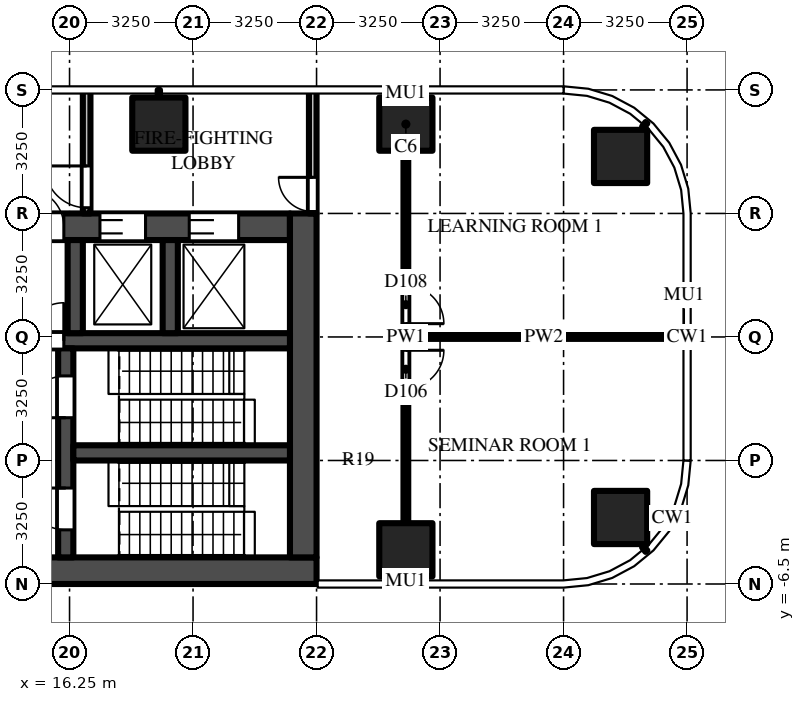
"""IFC4 building model, lengths in metres.
Left out: names, types, materials, properties, quantities, classifications, styles, units other than length and angle.
Written with IfcOpenShell. Run it as: python <this file> out.ifc"""

import sys

from ifc_helpers import new_model, si_unit, direction, frame, frame_2d, origin, origin_2d, place, context, subcontext, project, spatial, rectangle, extrude, source, transform, mapped, element, fill, save


model = new_model("IFC4")
c1 = context("Model", 3, precision=1e-05, world=origin(), true_north=direction((0.0, 1.0)))
c2 = subcontext(c1, "Body", "Model", "MODEL_VIEW")
j1 = project(units=[si_unit("LENGTHUNIT", "METRE"), si_unit("PLANEANGLEUNIT", "RADIAN")], contexts=[c1])
p1 = place(None, origin())
s1 = spatial("IfcSite", under=j1, at=p1, CompositionType="ELEMENT")
p2 = place(p1, origin())
s2 = spatial("IfcBuilding", under=s1, at=p2, CompositionType="ELEMENT")
p3 = place(p2, frame((0.0, 0.0, 61.0)))
s3 = spatial("IfcBuildingStorey", under=s2, at=p3, CompositionType="ELEMENT", Elevation=61.0)
m1 = source(origin(), c2, "Body", "SweptSolid", [
    extrude(rectangle(XDim=1.4, YDim=1.4, at=origin_2d()), origin(), (0.0, 0.0, 1.0), 4.5),
])
for number, where, z_axis, x_axis in (
    (1, (18.6, 5.6, 0.0), (0.0, 0.0, 1.0), (1.0, 0.0, 0.0)),
    (2, (25.1, 5.6, 0.0), (0.0, 0.0, 1.0), (1.0, 0.0, 0.0)),
    (3, (30.75, 4.75, 0.0), (0.0, 0.0, 1.0), (1.0, 0.0, 0.0)),
    (4, (25.1, -5.6, 0.0), (0.0, 0.0, 1.0), (1.0, 0.0, 0.0)),
    (5, (30.75, -4.75, 0.0), (0.0, 0.0, 1.0), (1.0, 0.0, 0.0)),
):
    element("IfcColumn", number, at=place(p3, frame(where, z_axis=z_axis, x_axis=x_axis)), inside=s3, PredefinedType="COLUMN", context=c2, shape_type="MappedRepresentation", body=[
        mapped(m1, transform((0.0, 0.0, 0.0))),
    ])
m2 = source(origin(), c2, "Body", "SweptSolid", [
    extrude(rectangle(XDim=16.45, YDim=0.7, at=frame_2d((8.225, 0.0))), origin(), (0.0, 0.0, 1.0), 4.25),
])
p4 = place(p3, frame((6.3, -6.15, 0.0), z_axis=(0.0, 0.0, 1.0), x_axis=(1.0, 0.0, 0.0)))
e6 = element("IfcWall", 6, at=p4, inside=s3, PredefinedType="SHEAR", context=c2, shape_type="MappedRepresentation", body=[
    mapped(m2, transform((0.0, 0.0, 0.0))),
])
m3 = source(origin(), c2, "Body", "SweptSolid", [
    extrude(rectangle(XDim=14.85, YDim=0.7, at=frame_2d((7.425, 0.0))), origin(), (0.0, 0.0, 1.0), 4.25),
])
p5 = place(p3, frame((7.2, 2.9, 0.0), z_axis=(0.0, 0.0, 1.0), x_axis=(1.0, 0.0, 0.0)))
e7 = element("IfcWall", 7, at=p5, inside=s3, PredefinedType="SHEAR", context=c2, shape_type="MappedRepresentation", body=[
    mapped(m3, transform((0.0, 0.0, 0.0))),
])
m4 = source(origin(), c2, "Body", "SweptSolid", [
    extrude(rectangle(XDim=1.3, YDim=2.1, at=frame_2d((0.65, 1.05))), frame((0.0, 0.36, 0.0), z_axis=(0.0, -1.0, 0.0), x_axis=(1.0, 0.0, 0.0)), (0.0, 0.0, 1.0), 0.72),
])
p6 = place(p5, frame((12.2, 0.0, 0.0)))
e8 = element("IfcOpeningElement", 8, at=p6, cuts=e7, PredefinedType="OPENING", context=c2, shape_type="MappedRepresentation", body=[
    mapped(m4, transform((0.0, 0.0, 0.0))),
])
m5 = source(origin(), c2, "Body", "SweptSolid", [
    extrude(rectangle(XDim=1.2, YDim=2.1, at=frame_2d((0.6, 1.05))), frame((0.0, 0.36, 0.0), z_axis=(0.0, -1.0, 0.0), x_axis=(1.0, 0.0, 0.0)), (0.0, 0.0, 1.0), 0.72),
])
p7 = place(p5, frame((9.85, 0.0, 0.0)))
e9 = element("IfcOpeningElement", 9, at=p7, cuts=e7, PredefinedType="OPENING", context=c2, shape_type="MappedRepresentation", body=[
    mapped(m5, transform((0.0, 0.0, 0.0))),
])
m6 = source(origin(), c2, "Body", "SweptSolid", [
    extrude(rectangle(XDim=1.0, YDim=2.1, at=frame_2d((0.5, 1.05))), frame((0.0, 0.36, 0.0), z_axis=(0.0, -1.0, 0.0), x_axis=(1.0, 0.0, 0.0)), (0.0, 0.0, 1.0), 0.72),
])
p8 = place(p5, frame((7.9, 0.0, 0.0)))
e10 = element("IfcOpeningElement", 10, at=p8, cuts=e7, PredefinedType="OPENING", context=c2, shape_type="MappedRepresentation", body=[
    mapped(m6, transform((0.0, 0.0, 0.0))),
])
m7 = source(origin(), c2, "Body", "SweptSolid", [
    extrude(rectangle(XDim=0.9, YDim=2.1, at=frame_2d((0.45, 1.05))), frame((0.0, 0.36, 0.0), z_axis=(0.0, -1.0, 0.0), x_axis=(1.0, 0.0, 0.0)), (0.0, 0.0, 1.0), 0.72),
])
p9 = place(p5, frame((0.65, 0.0, 0.0)))
e11 = element("IfcOpeningElement", 11, at=p9, cuts=e7, PredefinedType="OPENING", context=c2, shape_type="MappedRepresentation", body=[
    mapped(m7, transform((0.0, 0.0, 0.0))),
])
p10 = place(p5, frame((3.2, 0.0, 0.0)))
e12 = element("IfcOpeningElement", 12, at=p10, cuts=e7, PredefinedType="OPENING", context=c2, shape_type="MappedRepresentation", body=[
    mapped(m6, transform((0.0, 0.0, 0.0))),
])
p11 = place(p5, frame((5.85, 0.0, 0.0)))
e13 = element("IfcOpeningElement", 13, at=p11, cuts=e7, PredefinedType="OPENING", context=c2, shape_type="MappedRepresentation", body=[
    mapped(m7, transform((0.0, 0.0, 0.0))),
])
m8 = source(origin(), c2, "Body", "SweptSolid", [
    extrude(rectangle(XDim=9.05, YDim=0.7, at=frame_2d((4.525, 0.0))), origin(), (0.0, 0.0, 1.0), 4.25),
])
p12 = place(p3, frame((22.4, -5.8, 0.0), z_axis=(0.0, 0.0, 1.0), x_axis=(0.0, 1.0, 0.0)))
e14 = element("IfcWall", 14, at=p12, inside=s3, PredefinedType="SHEAR", context=c2, shape_type="MappedRepresentation", body=[
    mapped(m8, transform((0.0, 0.0, 0.0))),
])
m9 = source(origin(), c2, "Body", "SweptSolid", [
    extrude(rectangle(XDim=14.85, YDim=0.4, at=frame_2d((7.425, 0.0))), origin(), (0.0, 0.0, 1.0), 4.25),
])
p13 = place(p3, frame((7.2, -0.1, 0.0), z_axis=(0.0, 0.0, 1.0), x_axis=(1.0, 0.0, 0.0)))
e15 = element("IfcWall", 15, at=p13, inside=s3, PredefinedType="SHEAR", context=c2, shape_type="MappedRepresentation", body=[
    mapped(m9, transform((0.0, 0.0, 0.0))),
])
m10 = source(origin(), c2, "Body", "SweptSolid", [
    extrude(rectangle(XDim=1.0, YDim=2.1, at=frame_2d((0.5, 1.05))), frame((0.0, 0.21, 0.0), z_axis=(0.0, -1.0, 0.0), x_axis=(1.0, 0.0, 0.0)), (0.0, 0.0, 1.0), 0.42),
])
p14 = place(p13, frame((7.9, 0.0, 0.0)))
e16 = element("IfcOpeningElement", 16, at=p14, cuts=e15, PredefinedType="OPENING", context=c2, shape_type="MappedRepresentation", body=[
    mapped(m10, transform((0.0, 0.0, 0.0))),
])
m11 = source(origin(), c2, "Body", "SweptSolid", [
    extrude(rectangle(XDim=5.5, YDim=0.4, at=frame_2d((2.75, 0.0))), origin(), (0.0, 0.0, 1.0), 4.25),
])
p15 = place(p3, frame((16.15, -5.8, 0.0), z_axis=(0.0, 0.0, 1.0), x_axis=(0.0, 1.0, 0.0)))
e17 = element("IfcWall", 17, at=p15, inside=s3, PredefinedType="SHEAR", context=c2, shape_type="MappedRepresentation", body=[
    mapped(m11, transform((0.0, 0.0, 0.0))),
])
m12 = source(origin(), c2, "Body", "SweptSolid", [
    extrude(rectangle(XDim=1.1, YDim=2.1, at=frame_2d((0.55, 1.05))), frame((0.0, 0.21, 0.0), z_axis=(0.0, -1.0, 0.0), x_axis=(1.0, 0.0, 0.0)), (0.0, 0.0, 1.0), 0.42),
])
p16 = place(p15, frame((0.725, 0.0, 0.0)))
e18 = element("IfcOpeningElement", 18, at=p16, cuts=e17, PredefinedType="OPENING", context=c2, shape_type="MappedRepresentation", body=[
    mapped(m12, transform((0.0, 0.0, 0.0))),
])
p17 = place(p15, frame((3.675, 0.0, 0.0)))
e19 = element("IfcOpeningElement", 19, at=p17, cuts=e17, PredefinedType="OPENING", context=c2, shape_type="MappedRepresentation", body=[
    mapped(m12, transform((0.0, 0.0, 0.0))),
])
m13 = source(origin(), c2, "Body", "SweptSolid", [
    extrude(rectangle(XDim=5.7, YDim=0.4, at=frame_2d((2.85, 0.0))), origin(), (0.0, 0.0, 1.0), 4.25),
])
p18 = place(p3, frame((16.35, -3.05, 0.0), z_axis=(0.0, 0.0, 1.0), x_axis=(1.0, 0.0, 0.0)))
e20 = element("IfcWall", 20, at=p18, inside=s3, PredefinedType="SHEAR", context=c2, shape_type="MappedRepresentation", body=[
    mapped(m13, transform((0.0, 0.0, 0.0))),
])
m14 = source(origin(), c2, "Body", "SweptSolid", [
    extrude(rectangle(XDim=2.45, YDim=0.4, at=frame_2d((1.225, 0.0))), origin(), (0.0, 0.0, 1.0), 4.25),
])
for number, where, z_axis, x_axis in (
    (21, (16.4, 0.1, 0.0), (0.0, 0.0, 1.0), (0.0, 1.0, 0.0)),
    (22, (18.9, 0.1, 0.0), (0.0, 0.0, 1.0), (0.0, 1.0, 0.0)),
):
    element("IfcWall", number, at=place(p3, frame(where, z_axis=z_axis, x_axis=x_axis)), inside=s3, PredefinedType="SHEAR", context=c2, shape_type="MappedRepresentation", body=[
        mapped(m14, transform((0.0, 0.0, 0.0))),
    ])
m15 = source(origin(), c2, "Body", "SweptSolid", [
    extrude(rectangle(XDim=3.25, YDim=0.2, at=frame_2d((1.625, 0.0))), origin(), (0.0, 0.0, 1.0), 4.25),
])
p19 = place(p3, frame((16.7, 3.25, 0.0), z_axis=(0.0, 0.0, 1.0), x_axis=(0.0, 1.0, 0.0)))
e23 = element("IfcWall", 23, at=p19, inside=s3, PredefinedType="PARTITIONING", context=c2, shape_type="MappedRepresentation", body=[
    mapped(m15, transform((0.0, 0.0, 0.0))),
])
m16 = source(origin(), c2, "Body", "SweptSolid", [
    extrude(rectangle(XDim=1.1, YDim=2.1, at=frame_2d((0.55, 1.05))), frame((0.0, 0.11, 0.0), z_axis=(0.0, -1.0, 0.0), x_axis=(1.0, 0.0, 0.0)), (0.0, 0.0, 1.0), 0.22),
])
p20 = place(p19, frame((0.15, 0.0, 0.0)))
e24 = element("IfcOpeningElement", 24, at=p20, cuts=e23, PredefinedType="OPENING", context=c2, shape_type="MappedRepresentation", body=[
    mapped(m16, transform((0.0, 0.0, 0.0))),
])
p21 = place(p3, frame((22.65, 3.25, 0.0), z_axis=(0.0, 0.0, 1.0), x_axis=(0.0, 1.0, 0.0)))
e25 = element("IfcWall", 25, at=p21, inside=s3, PredefinedType="PARTITIONING", context=c2, shape_type="MappedRepresentation", body=[
    mapped(m15, transform((0.0, 0.0, 0.0))),
])
m17 = source(origin(), c2, "Body", "SweptSolid", [
    extrude(rectangle(XDim=0.9, YDim=2.1, at=frame_2d((0.45, 1.05))), frame((0.0, 0.11, 0.0), z_axis=(0.0, -1.0, 0.0), x_axis=(1.0, 0.0, 0.0)), (0.0, 0.0, 1.0), 0.22),
])
p22 = place(p21, frame((0.05, 0.0, 0.0)))
e26 = element("IfcOpeningElement", 26, at=p22, cuts=e25, PredefinedType="OPENING", context=c2, shape_type="MappedRepresentation", body=[
    mapped(m17, transform((0.0, 0.0, 0.0))),
])
m18 = source(origin(), c2, "Body", "SweptSolid", [
    extrude(rectangle(XDim=9.8, YDim=0.125, at=frame_2d((4.9, 0.0))), origin(), (0.0, 0.0, 1.0), 3.468),
])
p23 = place(p3, frame((25.1, 4.9, 0.0), z_axis=(0.0, 0.0, 1.0), x_axis=(0.0, -1.0, 0.0)))
e27 = element("IfcWall", 27, at=p23, inside=s3, PredefinedType="PARTITIONING", context=c2, shape_type="MappedRepresentation", body=[
    mapped(m18, transform((0.0, 0.0, 0.0))),
])
m19 = source(origin(), c2, "Body", "SweptSolid", [
    extrude(rectangle(XDim=1.0, YDim=2.1, at=frame_2d((0.5, 1.05))), frame((0.0, 0.073, 0.0), z_axis=(0.0, -1.0, 0.0), x_axis=(1.0, 0.0, 0.0)), (0.0, 0.0, 1.0), 0.145),
])
p24 = place(p23, frame((5.25, 0.0, 0.0)))
e28 = element("IfcOpeningElement", 28, at=p24, cuts=e27, PredefinedType="OPENING", context=c2, shape_type="MappedRepresentation", body=[
    mapped(m19, transform((0.0, 0.0, 0.0))),
])
p25 = place(p23, frame((3.55, 0.0, 0.0)))
e29 = element("IfcOpeningElement", 29, at=p25, cuts=e27, PredefinedType="OPENING", context=c2, shape_type="MappedRepresentation", body=[
    mapped(m19, transform((0.0, 0.0, 0.0))),
])
m20 = source(origin(), c2, "Body", "SweptSolid", [
    extrude(rectangle(XDim=7.137, YDim=0.1, at=frame_2d((3.569, 0.0))), origin(), (0.0, 0.0, 1.0), 3.33),
])
p26 = place(p3, frame((25.163, 0.0, 0.0), z_axis=(0.0, 0.0, 1.0), x_axis=(1.0, 0.0, 0.0)))
e30 = element("IfcWall", 30, at=p26, inside=s3, PredefinedType="PARTITIONING", context=c2, shape_type="MappedRepresentation", body=[
    mapped(m20, transform((0.0, 0.0, 0.0))),
])
m21 = source(origin(), c2, "Body", "SweptSolid", [
    extrude(rectangle(XDim=1.3, YDim=2.1, at=frame_2d((0.65, 1.05))), frame((0.0, -0.275, 0.0), z_axis=(0.0, -1.0, 0.0), x_axis=(1.0, 0.0, 0.0)), (0.0, 0.0, 1.0), 0.05),
])
p27 = place(p6, origin())
e31 = element("IfcDoor", 31, at=p27, inside=s3, OperationType="DOUBLE_DOOR_SLIDING", PredefinedType="DOOR", context=c2, shape_type="MappedRepresentation", body=[
    mapped(m21, transform((0.0, 0.0, 0.0))),
])
fill(e8, e31)
m22 = source(origin(), c2, "Body", "SweptSolid", [
    extrude(rectangle(XDim=1.2, YDim=2.1, at=frame_2d((0.6, 1.05))), frame((0.0, -0.275, 0.0), z_axis=(0.0, -1.0, 0.0), x_axis=(1.0, 0.0, 0.0)), (0.0, 0.0, 1.0), 0.05),
])
p28 = place(p7, origin())
e32 = element("IfcDoor", 32, at=p28, inside=s3, OperationType="DOUBLE_DOOR_SLIDING", PredefinedType="DOOR", context=c2, shape_type="MappedRepresentation", body=[
    mapped(m22, transform((0.0, 0.0, 0.0))),
])
fill(e9, e32)
m23 = source(origin(), c2, "Body", "SweptSolid", [
    extrude(rectangle(XDim=1.1, YDim=2.1, at=frame_2d((0.55, 1.05))), frame((0.0, 0.025, 0.0), z_axis=(0.0, -1.0, 0.0), x_axis=(1.0, 0.0, 0.0)), (0.0, 0.0, 1.0), 0.05),
])
p29 = place(p16, origin())
e33 = element("IfcDoor", 33, at=p29, inside=s3, OperationType="SINGLE_SWING_RIGHT", PredefinedType="DOOR", context=c2, shape_type="MappedRepresentation", body=[
    mapped(m23, transform((0.0, 0.0, 0.0))),
])
fill(e18, e33)
p30 = place(p17, origin())
e34 = element("IfcDoor", 34, at=p30, inside=s3, OperationType="SINGLE_SWING_LEFT", PredefinedType="DOOR", context=c2, shape_type="MappedRepresentation", body=[
    mapped(m23, transform((0.0, 0.0, 0.0))),
])
fill(e19, e34)
m24 = source(origin(), c2, "Body", "SweptSolid", [
    extrude(rectangle(XDim=1.0, YDim=2.1, at=frame_2d((0.5, 1.05))), frame((0.0, 0.025, 0.0), z_axis=(0.0, -1.0, 0.0), x_axis=(1.0, 0.0, 0.0)), (0.0, 0.0, 1.0), 0.05),
])
p31 = place(p14, origin())
e35 = element("IfcDoor", 35, at=p31, inside=s3, OperationType="SINGLE_SWING_RIGHT", PredefinedType="DOOR", context=c2, shape_type="MappedRepresentation", body=[
    mapped(m24, transform((0.0, 0.0, 0.0))),
])
fill(e16, e35)
m25 = source(origin(), c2, "Body", "SweptSolid", [
    extrude(rectangle(XDim=1.0, YDim=2.1, at=frame_2d((0.5, 1.05))), frame((0.0, -0.275, 0.0), z_axis=(0.0, -1.0, 0.0), x_axis=(1.0, 0.0, 0.0)), (0.0, 0.0, 1.0), 0.05),
])
p32 = place(p8, origin())
e36 = element("IfcDoor", 36, at=p32, inside=s3, OperationType="SINGLE_SWING_LEFT", PredefinedType="DOOR", context=c2, shape_type="MappedRepresentation", body=[
    mapped(m25, transform((0.0, 0.0, 0.0))),
])
fill(e10, e36)
p33 = place(p20, origin())
e37 = element("IfcDoor", 37, at=p33, inside=s3, OperationType="SINGLE_SWING_RIGHT", PredefinedType="DOOR", context=c2, shape_type="MappedRepresentation", body=[
    mapped(m23, transform((0.0, 0.0, 0.0))),
])
fill(e24, e37)
m26 = source(origin(), c2, "Body", "SweptSolid", [
    extrude(rectangle(XDim=0.9, YDim=2.1, at=frame_2d((0.45, 1.05))), frame((0.0, 0.025, 0.0), z_axis=(0.0, -1.0, 0.0), x_axis=(1.0, 0.0, 0.0)), (0.0, 0.0, 1.0), 0.05),
])
p34 = place(p22, origin())
e38 = element("IfcDoor", 38, at=p34, inside=s3, OperationType="SINGLE_SWING_RIGHT", PredefinedType="DOOR", context=c2, shape_type="MappedRepresentation", body=[
    mapped(m26, transform((0.0, 0.0, 0.0))),
])
fill(e26, e38)
p35 = place(p24, origin())
e39 = element("IfcDoor", 39, at=p35, inside=s3, OperationType="SINGLE_SWING_LEFT", PredefinedType="DOOR", context=c2, shape_type="MappedRepresentation", body=[
    mapped(m24, transform((0.0, 0.0, 0.0))),
])
fill(e28, e39)
p36 = place(p25, origin())
e40 = element("IfcDoor", 40, at=p36, inside=s3, OperationType="SINGLE_SWING_RIGHT", PredefinedType="DOOR", context=c2, shape_type="MappedRepresentation", body=[
    mapped(m24, transform((0.0, 0.0, 0.0))),
])
fill(e29, e40)
save(model, sys.argv[1])
